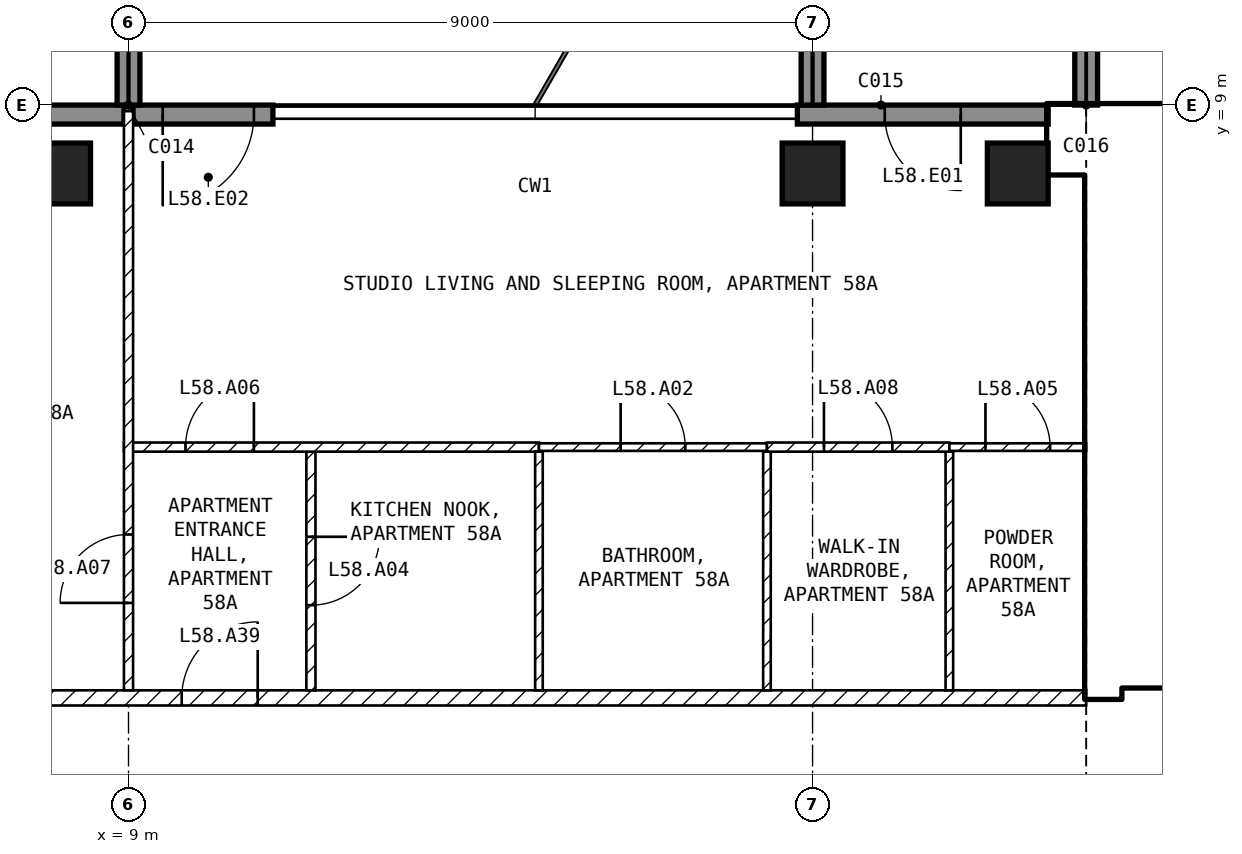
"""IFC4 building model, lengths in metres.
Left out: names, types, materials, properties, quantities, classifications, styles, units other than length and angle.
Written with IfcOpenShell. Run it as: python <this file> out.ifc"""

import sys

from ifc_helpers import new_model, si_unit, direction, frame, frame_2d, origin, origin_2d, place, context, subcontext, project, spatial, rectangle, extrude, element, fill, save


model = new_model("IFC4")
c1 = context("Model", 3, precision=1e-05, world=origin(), true_north=direction((0.0, 1.0)))
c2 = subcontext(c1, "Body", "Model", "MODEL_VIEW")
j1 = project(units=[si_unit("LENGTHUNIT", "METRE"), si_unit("PLANEANGLEUNIT", "RADIAN")], contexts=[c1])
p1 = place(None, origin())
s1 = spatial("IfcSite", under=j1, at=p1, CompositionType="ELEMENT")
p2 = place(p1, origin())
s2 = spatial("IfcBuilding", under=s1, at=p2, CompositionType="ELEMENT")
p3 = place(p2, frame((0.0, 0.0, 232.5)))
s3 = spatial("IfcBuildingStorey", under=s2, at=p3, CompositionType="ELEMENT", Elevation=232.5)
for number, where, z_axis, x_axis in (
    (1, (8.1, 8.1, -0.25), (0.0, 0.0, 1.0), (1.0, 0.0, 0.0)),
    (2, (18.0, 8.1, -0.25), (0.0, 0.0, 1.0), (1.0, 0.0, 0.0)),
    (3, (20.7, 8.1, -0.25), (0.0, 0.0, 1.0), (1.0, 0.0, 0.0)),
):
    element("IfcColumn", number, at=place(p3, frame(where, z_axis=z_axis, x_axis=x_axis)), inside=s3, PredefinedType="COLUMN", context=c2, shape_type="SweptSolid", body=[
        extrude(rectangle(XDim=0.8, YDim=0.8, at=origin_2d()), origin(), (0.0, 0.0, 1.0), 3.5),
    ])
p4 = place(p3, frame((21.1, 8.875, 0.0), z_axis=(0.0, 0.0, 1.0), x_axis=(-1.0, 0.0, 0.0)))
e4 = element("IfcWall", 4, at=p4, inside=s3, PredefinedType="SOLIDWALL", context=c2, shape_type="SweptSolid", body=[
    extrude(rectangle(XDim=3.3, YDim=0.25, at=frame_2d((1.65, 0.0))), origin(), (0.0, 0.0, 1.0), 3.25),
])
p5 = place(p4, frame((1.15, 0.0, 0.0)))
e5 = element("IfcOpeningElement", 5, at=p5, cuts=e4, PredefinedType="OPENING", context=c2, shape_type="SweptSolid", body=[
    extrude(rectangle(XDim=1.0, YDim=2.4, at=frame_2d((0.5, 1.2))), frame((0.0, 0.135, 0.0), z_axis=(0.0, -1.0, 0.0), x_axis=(1.0, 0.0, 0.0)), (0.0, 0.0, 1.0), 0.27),
])
p6 = place(p3, frame((10.9, 8.875, 0.0), z_axis=(0.0, 0.0, 1.0), x_axis=(-1.0, 0.0, 0.0)))
e6 = element("IfcWall", 6, at=p6, inside=s3, PredefinedType="SOLIDWALL", context=c2, shape_type="SweptSolid", body=[
    extrude(rectangle(XDim=1.84, YDim=0.25, at=frame_2d((0.92, 0.0))), origin(), (0.0, 0.0, 1.0), 3.25),
])
p7 = place(p6, frame((0.25, 0.0, 0.0)))
e7 = element("IfcOpeningElement", 7, at=p7, cuts=e6, PredefinedType="OPENING", context=c2, shape_type="SweptSolid", body=[
    extrude(rectangle(XDim=1.2, YDim=2.4, at=frame_2d((0.6, 1.2))), frame((0.0, 0.135, 0.0), z_axis=(0.0, -1.0, 0.0), x_axis=(1.0, 0.0, 0.0)), (0.0, 0.0, 1.0), 0.27),
])
p8 = place(p3, frame((8.94, 8.875, 0.0), z_axis=(0.0, 0.0, 1.0), x_axis=(-1.0, 0.0, 0.0)))
e8 = element("IfcWall", 8, at=p8, inside=s3, PredefinedType="SOLIDWALL", context=c2, shape_type="SweptSolid", body=[
    extrude(rectangle(XDim=3.04, YDim=0.25, at=frame_2d((1.52, 0.0))), origin(), (0.0, 0.0, 1.0), 3.25),
])
p9 = place(p8, frame((1.59, 0.0, 0.0)))
e9 = element("IfcOpeningElement", 9, at=p9, cuts=e8, PredefinedType="OPENING", context=c2, shape_type="SweptSolid", body=[
    extrude(rectangle(XDim=1.2, YDim=2.4, at=frame_2d((0.6, 1.2))), frame((0.0, 0.135, 0.0), z_axis=(0.0, -1.0, 0.0), x_axis=(1.0, 0.0, 0.0)), (0.0, 0.0, 1.0), 0.27),
])
for number, where, z_axis, x_axis in (
    (10, (9.0, 9.0, 0.0), (0.0, 0.0, 1.0), (0.0, 1.0, 0.0)),
    (11, (18.0, 9.0, 0.0), (0.0, 0.0, 1.0), (0.0, 1.0, 0.0)),
    (12, (21.6, 9.0, 0.0), (0.0, 0.0, 1.0), (0.0, 1.0, 0.0)),
):
    element("IfcWall", number, at=place(p3, frame(where, z_axis=z_axis, x_axis=x_axis)), inside=s3, PredefinedType="SOLIDWALL", context=c2, shape_type="SweptSolid", body=[
        extrude(rectangle(XDim=2.7, YDim=0.3, at=frame_2d((1.35, 0.0))), origin(), (0.0, 0.0, 1.0), 3.25),
    ])
p10 = place(p3, frame((21.1, 8.55, 0.0), z_axis=(0.0, 0.0, 1.0), x_axis=(1.0, 0.0, 0.0)))
e13 = element("IfcWall", 13, at=p10, inside=s3, PredefinedType="SHEAR", context=c2, shape_type="SweptSolid", body=[
    extrude(rectangle(XDim=8.65, YDim=0.9, at=frame_2d((4.325, 0.0))), origin(), (0.0, 0.0, 1.0), 3.25),
])
p11 = place(p3, frame((21.825, 1.2, 0.0), z_axis=(0.0, 0.0, 1.0), x_axis=(0.0, 1.0, 0.0)))
e14 = element("IfcWall", 14, at=p11, inside=s3, PredefinedType="SHEAR", context=c2, shape_type="SweptSolid", body=[
    extrude(rectangle(XDim=6.9, YDim=0.45, at=frame_2d((3.45, 0.0))), origin(), (0.0, 0.0, 1.0), 3.25),
])
p12 = place(p3, frame((22.05, 1.45, 0.0), z_axis=(0.0, 0.0, 1.0), x_axis=(1.0, 0.0, 0.0)))
e15 = element("IfcWall", 15, at=p12, inside=s3, PredefinedType="SOLIDWALL", context=c2, shape_type="SweptSolid", body=[
    extrude(rectangle(XDim=11.3, YDim=0.2, at=frame_2d((5.65, 0.0))), origin(), (0.0, 0.0, 1.0), 3.25),
])
p13 = place(p12, frame((0.75, 0.0, 0.0)))
e16 = element("IfcOpeningElement", 16, at=p13, cuts=e15, PredefinedType="OPENING", context=c2, shape_type="SweptSolid", body=[
    extrude(rectangle(XDim=1.0, YDim=2.1, at=frame_2d((0.5, 1.05))), frame((0.0, 0.11, 0.0), z_axis=(0.0, -1.0, 0.0), x_axis=(1.0, 0.0, 0.0)), (0.0, 0.0, 1.0), 0.22),
])
p14 = place(p12, frame((3.25, 0.0, 0.0)))
e17 = element("IfcOpeningElement", 17, at=p14, cuts=e15, PredefinedType="OPENING", context=c2, shape_type="SweptSolid", body=[
    extrude(rectangle(XDim=1.0, YDim=2.1, at=frame_2d((0.5, 1.05))), frame((0.0, 0.11, 0.0), z_axis=(0.0, -1.0, 0.0), x_axis=(1.0, 0.0, 0.0)), (0.0, 0.0, 1.0), 0.22),
])
p15 = place(p12, frame((9.225, 0.0, 0.0)))
e18 = element("IfcOpeningElement", 18, at=p15, cuts=e15, PredefinedType="OPENING", context=c2, shape_type="SweptSolid", body=[
    extrude(rectangle(XDim=0.9, YDim=2.1, at=frame_2d((0.45, 1.05))), frame((0.0, 0.11, 0.0), z_axis=(0.0, -1.0, 0.0), x_axis=(1.0, 0.0, 0.0)), (0.0, 0.0, 1.0), 0.22),
])
p16 = place(p3, frame((22.05, 5.15, 0.0), z_axis=(0.0, 0.0, 1.0), x_axis=(1.0, 0.0, 0.0)))
e19 = element("IfcWall", 19, at=p16, inside=s3, PredefinedType="SOLIDWALL", context=c2, shape_type="SweptSolid", body=[
    extrude(rectangle(XDim=6.3, YDim=0.2, at=frame_2d((3.15, 0.0))), origin(), (0.0, 0.0, 1.0), 3.25),
])
p17 = place(p16, frame((0.2, 0.0, 0.0)))
e20 = element("IfcOpeningElement", 20, at=p17, cuts=e19, PredefinedType="OPENING", context=c2, shape_type="SweptSolid", body=[
    extrude(rectangle(XDim=1.0, YDim=2.1, at=frame_2d((0.5, 1.05))), frame((0.0, 0.11, 0.0), z_axis=(0.0, -1.0, 0.0), x_axis=(1.0, 0.0, 0.0)), (0.0, 0.0, 1.0), 0.22),
])
p18 = place(p3, frame((4.4, 1.2, 0.0), z_axis=(0.0, 0.0, 1.0), x_axis=(1.0, 0.0, 0.0)))
e21 = element("IfcWall", 21, at=p18, inside=s3, PredefinedType="PARTITIONING", context=c2, shape_type="SweptSolid", body=[
    extrude(rectangle(XDim=17.2, YDim=0.2, at=frame_2d((8.6, 0.0))), origin(), (0.0, 0.0, 1.0), 3.25),
])
p19 = place(p18, frame((5.3, 0.0, 0.0)))
e22 = element("IfcOpeningElement", 22, at=p19, cuts=e21, PredefinedType="OPENING", context=c2, shape_type="SweptSolid", body=[
    extrude(rectangle(XDim=1.0, YDim=2.1, at=frame_2d((0.5, 1.05))), frame((0.0, 0.11, 0.0), z_axis=(0.0, -1.0, 0.0), x_axis=(1.0, 0.0, 0.0)), (0.0, 0.0, 1.0), 0.22),
])
p20 = place(p3, frame((11.4, 4.44, 0.0), z_axis=(0.0, 0.0, 1.0), x_axis=(0.0, -1.0, 0.0)))
e23 = element("IfcWall", 23, at=p20, inside=s3, PredefinedType="PARTITIONING", context=c2, shape_type="SweptSolid", body=[
    extrude(rectangle(XDim=3.14, YDim=0.12, at=frame_2d((1.57, 0.0))), origin(), (0.0, 0.0, 1.0), 3.25),
])
p21 = place(p20, frame((1.12, 0.0, 0.0)))
e24 = element("IfcOpeningElement", 24, at=p21, cuts=e23, PredefinedType="OPENING", context=c2, shape_type="SweptSolid", body=[
    extrude(rectangle(XDim=0.9, YDim=2.1, at=frame_2d((0.45, 1.05))), frame((0.0, 0.07, 0.0), z_axis=(0.0, -1.0, 0.0), x_axis=(1.0, 0.0, 0.0)), (0.0, 0.0, 1.0), 0.14),
])
p22 = place(p3, frame((8.94, 4.5, 0.0), z_axis=(0.0, 0.0, 1.0), x_axis=(1.0, 0.0, 0.0)))
e25 = element("IfcWall", 25, at=p22, inside=s3, PredefinedType="PARTITIONING", context=c2, shape_type="SweptSolid", body=[
    extrude(rectangle(XDim=5.46, YDim=0.12, at=frame_2d((2.73, 0.0))), origin(), (0.0, 0.0, 1.0), 3.25),
])
p23 = place(p22, frame((0.81, 0.0, 0.0)))
e26 = element("IfcOpeningElement", 26, at=p23, cuts=e25, PredefinedType="OPENING", context=c2, shape_type="SweptSolid", body=[
    extrude(rectangle(XDim=0.9, YDim=2.1, at=frame_2d((0.45, 1.05))), frame((0.0, 0.07, 0.0), z_axis=(0.0, -1.0, 0.0), x_axis=(1.0, 0.0, 0.0)), (0.0, 0.0, 1.0), 0.14),
])
p24 = place(p3, frame((9.0, 1.3, 0.0), z_axis=(0.0, 0.0, 1.0), x_axis=(0.0, 1.0, 0.0)))
e27 = element("IfcWall", 27, at=p24, inside=s3, PredefinedType="PARTITIONING", context=c2, shape_type="SweptSolid", body=[
    extrude(rectangle(XDim=7.62, YDim=0.12, at=frame_2d((3.81, 0.0))), origin(), (0.0, 0.0, 1.0), 3.25),
])
p25 = place(p24, frame((1.15, 0.0, 0.0)))
e28 = element("IfcOpeningElement", 28, at=p25, cuts=e27, PredefinedType="OPENING", context=c2, shape_type="SweptSolid", body=[
    extrude(rectangle(XDim=0.9, YDim=2.1, at=frame_2d((0.45, 1.05))), frame((0.0, 0.07, 0.0), z_axis=(0.0, -1.0, 0.0), x_axis=(1.0, 0.0, 0.0)), (0.0, 0.0, 1.0), 0.14),
])
for number, where, z_axis, x_axis in (
    (29, (14.4, 4.44, 0.0), (0.0, 0.0, 1.0), (0.0, -1.0, 0.0)),
    (30, (17.4, 4.44, 0.0), (0.0, 0.0, 1.0), (0.0, -1.0, 0.0)),
):
    element("IfcWall", number, at=place(p3, frame(where, z_axis=z_axis, x_axis=x_axis)), inside=s3, PredefinedType="PARTITIONING", context=c2, shape_type="SweptSolid", body=[
        extrude(rectangle(XDim=3.14, YDim=0.1, at=frame_2d((1.57, 0.0))), origin(), (0.0, 0.0, 1.0), 3.25),
    ])
p26 = place(p3, frame((14.4, 4.5, 0.0), z_axis=(0.0, 0.0, 1.0), x_axis=(1.0, 0.0, 0.0)))
e31 = element("IfcWall", 31, at=p26, inside=s3, PredefinedType="PARTITIONING", context=c2, shape_type="SweptSolid", body=[
    extrude(rectangle(XDim=3.0, YDim=0.1, at=frame_2d((1.5, 0.0))), origin(), (0.0, 0.0, 1.0), 3.25),
])
p27 = place(p26, frame((1.075, 0.0, 0.0)))
e32 = element("IfcOpeningElement", 32, at=p27, cuts=e31, PredefinedType="OPENING", context=c2, shape_type="SweptSolid", body=[
    extrude(rectangle(XDim=0.85, YDim=2.1, at=frame_2d((0.425, 1.05))), frame((0.0, 0.06, 0.0), z_axis=(0.0, -1.0, 0.0), x_axis=(1.0, 0.0, 0.0)), (0.0, 0.0, 1.0), 0.12),
])
p28 = place(p3, frame((19.8, 4.44, 0.0), z_axis=(0.0, 0.0, 1.0), x_axis=(0.0, -1.0, 0.0)))
e33 = element("IfcWall", 33, at=p28, inside=s3, PredefinedType="PARTITIONING", context=c2, shape_type="SweptSolid", body=[
    extrude(rectangle(XDim=3.14, YDim=0.1, at=frame_2d((1.57, 0.0))), origin(), (0.0, 0.0, 1.0), 3.25),
])
p29 = place(p3, frame((17.4, 4.5, 0.0), z_axis=(0.0, 0.0, 1.0), x_axis=(1.0, 0.0, 0.0)))
e34 = element("IfcWall", 34, at=p29, inside=s3, PredefinedType="PARTITIONING", context=c2, shape_type="SweptSolid", body=[
    extrude(rectangle(XDim=2.4, YDim=0.12, at=frame_2d((1.2, 0.0))), origin(), (0.0, 0.0, 1.0), 3.25),
])
p30 = place(p29, frame((0.75, 0.0, 0.0)))
e35 = element("IfcOpeningElement", 35, at=p30, cuts=e34, PredefinedType="OPENING", context=c2, shape_type="SweptSolid", body=[
    extrude(rectangle(XDim=0.9, YDim=2.1, at=frame_2d((0.45, 1.05))), frame((0.0, 0.07, 0.0), z_axis=(0.0, -1.0, 0.0), x_axis=(1.0, 0.0, 0.0)), (0.0, 0.0, 1.0), 0.14),
])
p31 = place(p3, frame((19.8, 4.5, 0.0), z_axis=(0.0, 0.0, 1.0), x_axis=(1.0, 0.0, 0.0)))
e36 = element("IfcWall", 36, at=p31, inside=s3, PredefinedType="PARTITIONING", context=c2, shape_type="SweptSolid", body=[
    extrude(rectangle(XDim=1.8, YDim=0.1, at=frame_2d((0.9, 0.0))), origin(), (0.0, 0.0, 1.0), 3.25),
])
p32 = place(p31, frame((0.475, 0.0, 0.0)))
e37 = element("IfcOpeningElement", 37, at=p32, cuts=e36, PredefinedType="OPENING", context=c2, shape_type="SweptSolid", body=[
    extrude(rectangle(XDim=0.85, YDim=2.1, at=frame_2d((0.425, 1.05))), frame((0.0, 0.06, 0.0), z_axis=(0.0, -1.0, 0.0), x_axis=(1.0, 0.0, 0.0)), (0.0, 0.0, 1.0), 0.12),
])
p33 = place(p5, origin())
e38 = element("IfcDoor", 38, at=p33, inside=s3, OperationType="SINGLE_SWING_LEFT", PredefinedType="DOOR", context=c2, shape_type="SweptSolid", body=[
    extrude(rectangle(XDim=1.0, YDim=2.4, at=frame_2d((0.5, 1.2))), frame((0.0, 0.025, 0.0), z_axis=(0.0, -1.0, 0.0), x_axis=(1.0, 0.0, 0.0)), (0.0, 0.0, 1.0), 0.05),
])
fill(e5, e38)
p34 = place(p7, origin())
e39 = element("IfcDoor", 39, at=p34, inside=s3, OperationType="SINGLE_SWING_RIGHT", PredefinedType="DOOR", context=c2, shape_type="SweptSolid", body=[
    extrude(rectangle(XDim=1.2, YDim=2.4, at=frame_2d((0.6, 1.2))), frame((0.0, 0.025, 0.0), z_axis=(0.0, -1.0, 0.0), x_axis=(1.0, 0.0, 0.0)), (0.0, 0.0, 1.0), 0.05),
])
fill(e7, e39)
p35 = place(p17, origin())
e40 = element("IfcDoor", 40, at=p35, inside=s3, OperationType="SINGLE_SWING_LEFT", PredefinedType="DOOR", context=c2, shape_type="SweptSolid", body=[
    extrude(rectangle(XDim=1.0, YDim=2.1, at=frame_2d((0.5, 1.05))), frame((0.0, 0.025, 0.0), z_axis=(0.0, -1.0, 0.0), x_axis=(1.0, 0.0, 0.0)), (0.0, 0.0, 1.0), 0.05),
])
fill(e20, e40)
p36 = place(p27, origin())
e41 = element("IfcDoor", 41, at=p36, inside=s3, OperationType="SINGLE_SWING_LEFT", PredefinedType="DOOR", context=c2, shape_type="SweptSolid", body=[
    extrude(rectangle(XDim=0.85, YDim=2.1, at=frame_2d((0.425, 1.05))), frame((0.0, 0.025, 0.0), z_axis=(0.0, -1.0, 0.0), x_axis=(1.0, 0.0, 0.0)), (0.0, 0.0, 1.0), 0.05),
])
fill(e32, e41)
p37 = place(p21, origin())
e42 = element("IfcDoor", 42, at=p37, inside=s3, OperationType="SINGLE_SWING_LEFT", PredefinedType="DOOR", context=c2, shape_type="SweptSolid", body=[
    extrude(rectangle(XDim=0.9, YDim=2.1, at=frame_2d((0.45, 1.05))), frame((0.0, 0.025, 0.0), z_axis=(0.0, -1.0, 0.0), x_axis=(1.0, 0.0, 0.0)), (0.0, 0.0, 1.0), 0.05),
])
fill(e24, e42)
p38 = place(p32, origin())
e43 = element("IfcDoor", 43, at=p38, inside=s3, OperationType="SINGLE_SWING_LEFT", PredefinedType="DOOR", context=c2, shape_type="SweptSolid", body=[
    extrude(rectangle(XDim=0.85, YDim=2.1, at=frame_2d((0.425, 1.05))), frame((0.0, 0.025, 0.0), z_axis=(0.0, -1.0, 0.0), x_axis=(1.0, 0.0, 0.0)), (0.0, 0.0, 1.0), 0.05),
])
fill(e37, e43)
p39 = place(p23, origin())
e44 = element("IfcDoor", 44, at=p39, inside=s3, OperationType="SINGLE_SWING_RIGHT", PredefinedType="DOOR", context=c2, shape_type="SweptSolid", body=[
    extrude(rectangle(XDim=0.9, YDim=2.1, at=frame_2d((0.45, 1.05))), frame((0.0, 0.025, 0.0), z_axis=(0.0, -1.0, 0.0), x_axis=(1.0, 0.0, 0.0)), (0.0, 0.0, 1.0), 0.05),
])
fill(e26, e44)
p40 = place(p25, origin())
e45 = element("IfcDoor", 45, at=p40, inside=s3, OperationType="SINGLE_SWING_LEFT", PredefinedType="DOOR", context=c2, shape_type="SweptSolid", body=[
    extrude(rectangle(XDim=0.9, YDim=2.1, at=frame_2d((0.45, 1.05))), frame((0.0, 0.025, 0.0), z_axis=(0.0, -1.0, 0.0), x_axis=(1.0, 0.0, 0.0)), (0.0, 0.0, 1.0), 0.05),
])
fill(e28, e45)
p41 = place(p30, origin())
e46 = element("IfcDoor", 46, at=p41, inside=s3, OperationType="SINGLE_SWING_LEFT", PredefinedType="DOOR", context=c2, shape_type="SweptSolid", body=[
    extrude(rectangle(XDim=0.9, YDim=2.1, at=frame_2d((0.45, 1.05))), frame((0.0, 0.025, 0.0), z_axis=(0.0, -1.0, 0.0), x_axis=(1.0, 0.0, 0.0)), (0.0, 0.0, 1.0), 0.05),
])
fill(e35, e46)
p42 = place(p19, origin())
e47 = element("IfcDoor", 47, at=p42, inside=s3, OperationType="SINGLE_SWING_RIGHT", PredefinedType="DOOR", context=c2, shape_type="SweptSolid", body=[
    extrude(rectangle(XDim=1.0, YDim=2.1, at=frame_2d((0.5, 1.05))), frame((0.0, 0.025, 0.0), z_axis=(0.0, -1.0, 0.0), x_axis=(1.0, 0.0, 0.0)), (0.0, 0.0, 1.0), 0.05),
])
fill(e22, e47)
save(model, sys.argv[1])
